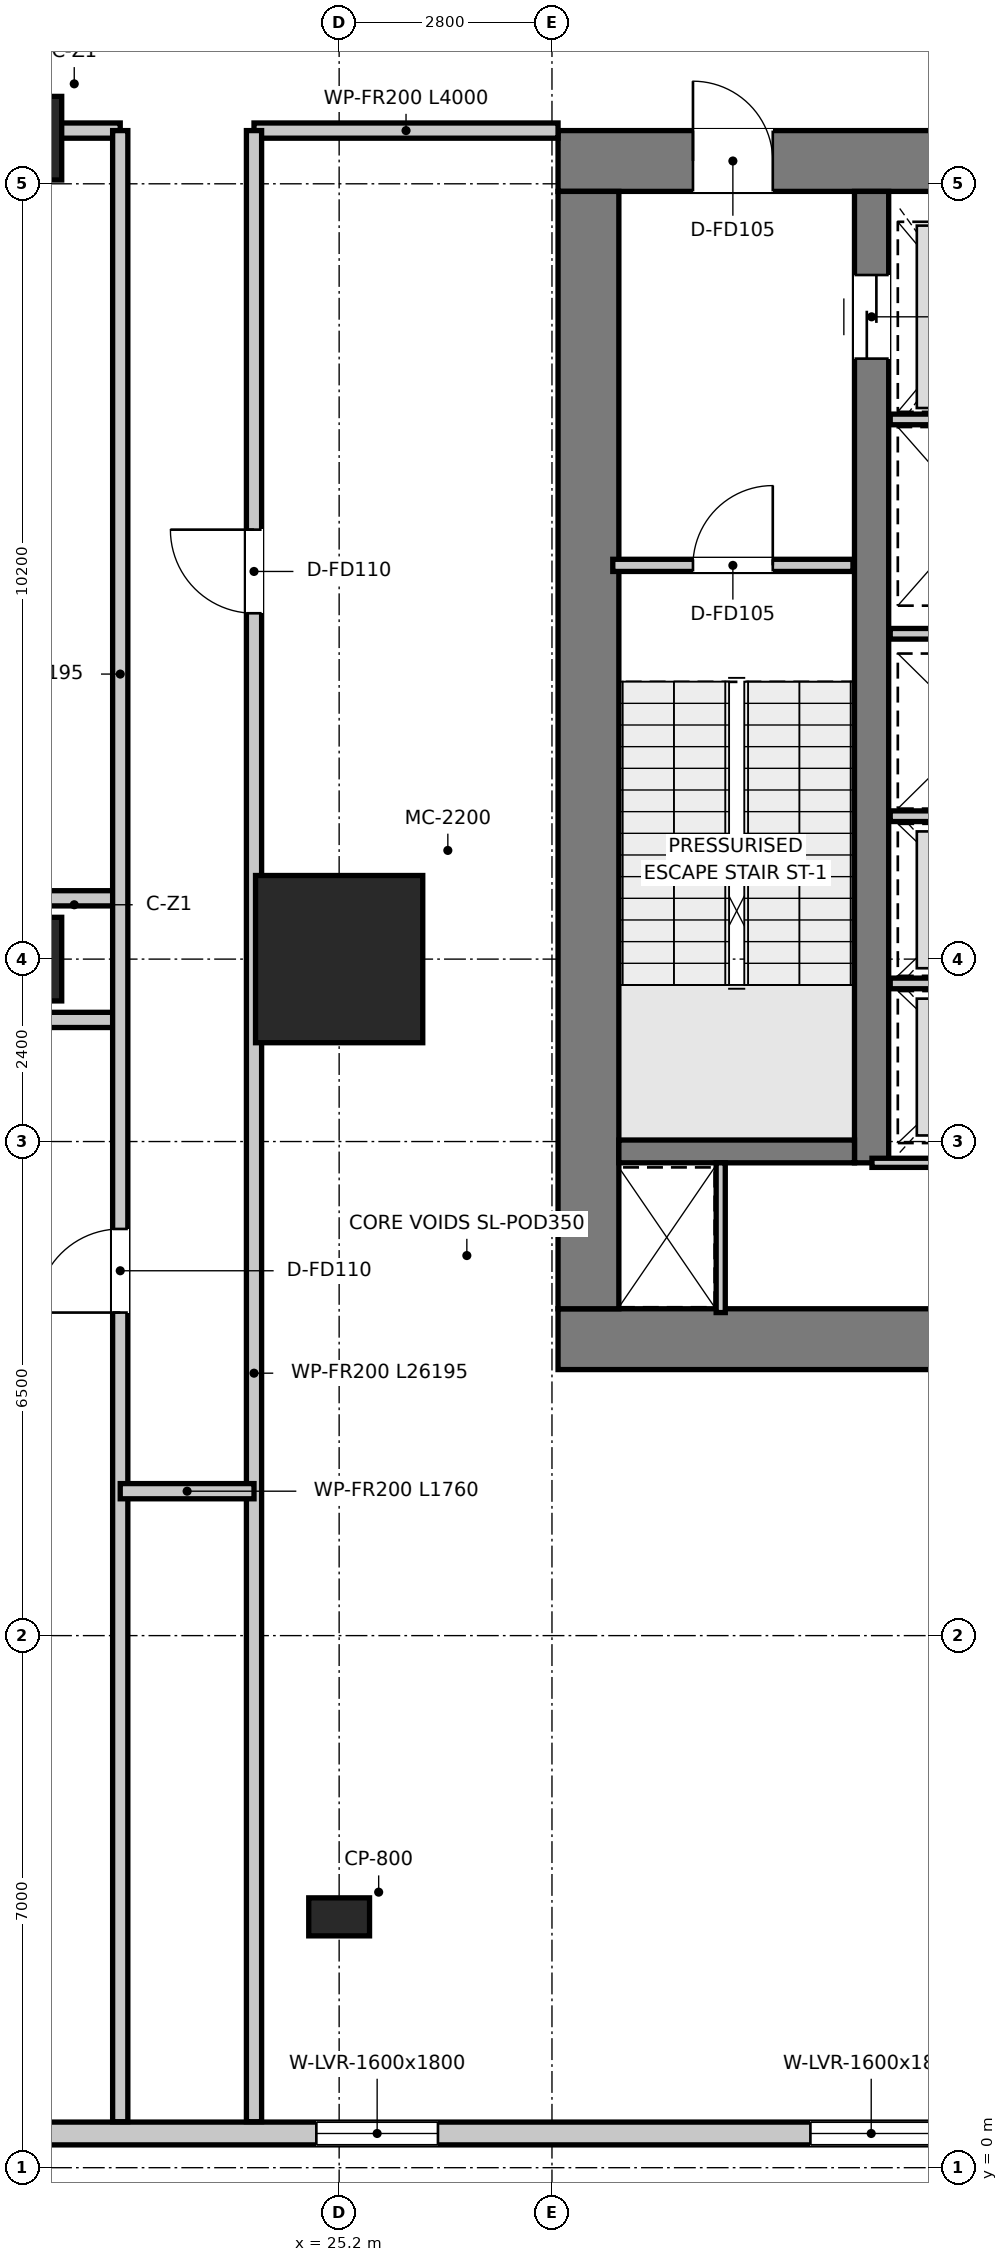
"""IFC4 building model, lengths in metres.
Left out: names, types, materials, properties, quantities, classifications, styles, units other than length and angle.
Written with IfcOpenShell. Run it as: python <this file> out.ifc"""

import sys

from ifc_helpers import new_model, si_unit, direction, frame, frame_2d, origin, origin_2d, place, context, subcontext, project, spatial, rectangle, extrude, source, transform, mapped, element, fill, save


model = new_model("IFC4")
c1 = context("Model", 3, precision=1e-05, world=origin(), true_north=direction((0.0, 1.0)))
c2 = subcontext(c1, "Body", "Model", "MODEL_VIEW")
j1 = project(units=[si_unit("LENGTHUNIT", "METRE"), si_unit("PLANEANGLEUNIT", "RADIAN")], contexts=[c1])
p1 = place(None, origin())
s1 = spatial("IfcSite", under=j1, at=p1, CompositionType="ELEMENT")
p2 = place(p1, origin())
s2 = spatial("IfcBuilding", under=s1, at=p2, CompositionType="ELEMENT")
p3 = place(p2, frame((0.0, 0.0, 20.0)))
s3 = spatial("IfcBuildingStorey", under=s2, at=p3, CompositionType="ELEMENT", Elevation=20.0)
p4 = place(p3, frame((28.08, 10.9, 0.0), z_axis=(0.0, 0.0, 1.0), x_axis=(1.0, 0.0, 0.0)))
e1 = element("IfcWall", 1, at=p4, inside=s3, PredefinedType="SHEAR", context=c2, shape_type="SweptSolid", body=[
    extrude(rectangle(XDim=15.84, YDim=0.8, at=frame_2d((7.92, 0.0))), origin(), (0.0, 0.0, 1.0), 5.0),
])
p5 = place(p3, frame((28.08, 26.4, 0.0), z_axis=(0.0, 0.0, 1.0), x_axis=(1.0, 0.0, 0.0)))
e2 = element("IfcWall", 2, at=p5, inside=s3, PredefinedType="SHEAR", context=c2, shape_type="SweptSolid", body=[
    extrude(rectangle(XDim=15.84, YDim=0.8, at=frame_2d((7.92, 0.0))), origin(), (0.0, 0.0, 1.0), 5.0),
])
p6 = place(p5, frame((7.22, 0.0, 0.0)))
e3 = element("IfcOpeningElement", 3, at=p6, cuts=e2, PredefinedType="OPENING", context=c2, shape_type="SweptSolid", body=[
    extrude(rectangle(XDim=1.4, YDim=2.2, at=frame_2d((0.7, 1.1))), frame((0.0, 0.41, 0.0), z_axis=(0.0, -1.0, 0.0), x_axis=(1.0, 0.0, 0.0)), (0.0, 0.0, 1.0), 0.82),
])
p7 = place(p5, frame((1.775, 0.0, 0.0)))
e4 = element("IfcOpeningElement", 4, at=p7, cuts=e2, PredefinedType="OPENING", context=c2, shape_type="SweptSolid", body=[
    extrude(rectangle(XDim=1.05, YDim=2.1, at=frame_2d((0.525, 1.05))), frame((0.0, 0.41, 0.0), z_axis=(0.0, -1.0, 0.0), x_axis=(1.0, 0.0, 0.0)), (0.0, 0.0, 1.0), 0.82),
])
p8 = place(p5, frame((13.015, 0.0, 0.0)))
e5 = element("IfcOpeningElement", 5, at=p8, cuts=e2, PredefinedType="OPENING", context=c2, shape_type="SweptSolid", body=[
    extrude(rectangle(XDim=1.05, YDim=2.1, at=frame_2d((0.525, 1.05))), frame((0.0, 0.41, 0.0), z_axis=(0.0, -1.0, 0.0), x_axis=(1.0, 0.0, 0.0)), (0.0, 0.0, 1.0), 0.82),
])
p9 = place(p3, frame((28.48, 11.3, 0.0), z_axis=(0.0, 0.0, 1.0), x_axis=(0.0, 1.0, 0.0)))
e6 = element("IfcWall", 6, at=p9, inside=s3, PredefinedType="SHEAR", context=c2, shape_type="SweptSolid", body=[
    extrude(rectangle(XDim=14.7, YDim=0.8, at=frame_2d((7.35, 0.0))), origin(), (0.0, 0.0, 1.0), 5.0),
])
p10 = place(p3, frame((32.205, 13.22, 0.0), z_axis=(0.0, 0.0, 1.0), x_axis=(0.0, 1.0, 0.0)))
e7 = element("IfcWall", 7, at=p10, inside=s3, PredefinedType="SHEAR", context=c2, shape_type="SweptSolid", body=[
    extrude(rectangle(XDim=12.78, YDim=0.45, at=frame_2d((6.39, 0.0))), origin(), (0.0, 0.0, 1.0), 5.0),
])
p11 = place(p10, frame((10.58, 0.0, 0.0)))
e8 = element("IfcOpeningElement", 8, at=p11, cuts=e7, PredefinedType="OPENING", context=c2, shape_type="SweptSolid", body=[
    extrude(rectangle(XDim=1.1, YDim=2.15, at=frame_2d((0.55, 1.075))), frame((0.0, 0.235, 0.0), z_axis=(0.0, -1.0, 0.0), x_axis=(1.0, 0.0, 0.0)), (0.0, 0.0, 1.0), 0.47),
])
p12 = place(p3, frame((28.88, 13.37, 0.0), z_axis=(0.0, 0.0, 1.0), x_axis=(1.0, 0.0, 0.0)))
e9 = element("IfcWall", 9, at=p12, inside=s3, PredefinedType="SHEAR", context=c2, shape_type="SweptSolid", body=[
    extrude(rectangle(XDim=3.1, YDim=0.3, at=frame_2d((1.55, 0.0))), origin(), (0.0, 0.0, 1.0), 5.0),
])
m1 = source(origin(), c2, "Body", "SweptSolid", [
    extrude(rectangle(XDim=2.2, YDim=2.2, at=origin_2d()), origin(), (0.0, 0.0, 1.0), 5.0),
])
p13 = place(p3, frame((25.2, 15.9, 0.0), z_axis=(0.0, 0.0, 1.0), x_axis=(1.0, 0.0, 0.0)))
e10 = element("IfcColumn", 10, at=p13, inside=s3, PredefinedType="USERDEFINED", context=c2, shape_type="MappedRepresentation", body=[
    mapped(m1, transform((0.0, 0.0, 0.0), x_axis=(1.0, 0.0, 0.0), y_axis=(0.0, 1.0, 0.0), z_axis=(0.0, 0.0, 1.0), scale=1.0)),
])
m2 = source(origin(), c2, "Body", "SweptSolid", [
    extrude(rectangle(XDim=1.1, YDim=1.1, at=origin_2d()), origin(), (0.0, 0.0, 1.0), 5.0),
])
for number, where, z_axis, x_axis in (
    (11, (21.0, 15.9, 0.0), (0.0, 0.0, 1.0), (1.0, 0.0, 0.0)),
    (12, (21.0, 26.7, 0.0), (0.0, 0.0, 1.0), (1.0, 0.0, 0.0)),
):
    element("IfcColumn", number, at=place(p3, frame(where, z_axis=z_axis, x_axis=x_axis)), inside=s3, PredefinedType="COLUMN", context=c2, shape_type="MappedRepresentation", body=[
        mapped(m2, transform((0.0, 0.0, 0.0), x_axis=(1.0, 0.0, 0.0), y_axis=(0.0, 1.0, 0.0), z_axis=(0.0, 0.0, 1.0), scale=1.0)),
    ])
m3 = source(origin(), c2, "Body", "SweptSolid", [
    extrude(rectangle(XDim=0.8, YDim=0.5, at=origin_2d()), origin(), (0.0, 0.0, 1.0), 5.0),
])
p14 = place(p3, frame((25.2, 3.3, 0.0), z_axis=(0.0, 0.0, 1.0), x_axis=(1.0, 0.0, 0.0)))
e13 = element("IfcColumn", 13, at=p14, inside=s3, PredefinedType="PILASTER", context=c2, shape_type="MappedRepresentation", body=[
    mapped(m3, transform((0.0, 0.0, 0.0), x_axis=(1.0, 0.0, 0.0), y_axis=(0.0, 1.0, 0.0), z_axis=(0.0, 0.0, 1.0), scale=1.0)),
])
p15 = place(p3, frame((61.0, 0.45, 0.0), z_axis=(0.0, 0.0, 1.0), x_axis=(-1.0, 0.0, 0.0)))
e14 = element("IfcWall", 14, at=p15, inside=s3, PredefinedType="SOLIDWALL", context=c2, shape_type="SweptSolid", body=[
    extrude(rectangle(XDim=50.0, YDim=0.3, at=frame_2d((25.0, 0.0))), origin(), (0.0, 0.0, 1.0), 4.72),
])
p16 = place(p15, frame((43.5, 0.0, 1.2)))
e15 = element("IfcOpeningElement", 15, at=p16, cuts=e14, PredefinedType="OPENING", context=c2, shape_type="SweptSolid", body=[
    extrude(rectangle(XDim=1.6, YDim=1.8, at=frame_2d((0.8, 0.9))), frame((0.0, 0.16, 0.0), z_axis=(0.0, -1.0, 0.0), x_axis=(1.0, 0.0, 0.0)), (0.0, 0.0, 1.0), 0.32),
])
p17 = place(p15, frame((34.5, 0.0, 1.2)))
e16 = element("IfcOpeningElement", 16, at=p17, cuts=e14, PredefinedType="OPENING", context=c2, shape_type="SweptSolid", body=[
    extrude(rectangle(XDim=1.6, YDim=1.8, at=frame_2d((0.8, 0.9))), frame((0.0, 0.16, 0.0), z_axis=(0.0, -1.0, 0.0), x_axis=(1.0, 0.0, 0.0)), (0.0, 0.0, 1.0), 0.32),
])
p18 = place(p15, frame((28.0, 0.0, 1.2)))
e17 = element("IfcOpeningElement", 17, at=p18, cuts=e14, PredefinedType="OPENING", context=c2, shape_type="SweptSolid", body=[
    extrude(rectangle(XDim=1.6, YDim=1.8, at=frame_2d((0.8, 0.9))), frame((0.0, 0.16, 0.0), z_axis=(0.0, -1.0, 0.0), x_axis=(1.0, 0.0, 0.0)), (0.0, 0.0, 1.0), 0.32),
])
p19 = place(p15, frame((20.0, 0.0, 1.2)))
e18 = element("IfcOpeningElement", 18, at=p19, cuts=e14, PredefinedType="OPENING", context=c2, shape_type="SweptSolid", body=[
    extrude(rectangle(XDim=1.6, YDim=1.8, at=frame_2d((0.8, 0.9))), frame((0.0, 0.16, 0.0), z_axis=(0.0, -1.0, 0.0), x_axis=(1.0, 0.0, 0.0)), (0.0, 0.0, 1.0), 0.32),
])
p20 = place(p15, frame((10.5, 0.0, 1.2)))
e19 = element("IfcOpeningElement", 19, at=p20, cuts=e14, PredefinedType="OPENING", context=c2, shape_type="SweptSolid", body=[
    extrude(rectangle(XDim=1.6, YDim=1.8, at=frame_2d((0.8, 0.9))), frame((0.0, 0.16, 0.0), z_axis=(0.0, -1.0, 0.0), x_axis=(1.0, 0.0, 0.0)), (0.0, 0.0, 1.0), 0.32),
])
p21 = place(p3, frame((28.8, 21.08, 0.0), z_axis=(0.0, 0.0, 1.0), x_axis=(1.0, 0.0, 0.0)))
e20 = element("IfcWall", 20, at=p21, inside=s3, PredefinedType="PARTITIONING", context=c2, shape_type="SweptSolid", body=[
    extrude(rectangle(XDim=3.16, YDim=0.16, at=frame_2d((1.58, 0.0))), origin(), (0.0, 0.0, 1.0), 4.72),
])
p22 = place(p21, frame((1.055, 0.0, 0.0)))
e21 = element("IfcOpeningElement", 21, at=p22, cuts=e20, PredefinedType="OPENING", context=c2, shape_type="SweptSolid", body=[
    extrude(rectangle(XDim=1.05, YDim=2.1, at=frame_2d((0.525, 1.05))), frame((0.0, 0.09, 0.0), z_axis=(0.0, -1.0, 0.0), x_axis=(1.0, 0.0, 0.0)), (0.0, 0.0, 1.0), 0.18),
])
p23 = place(p3, frame((32.45, 23.0, 0.0), z_axis=(0.0, 0.0, 1.0), x_axis=(1.0, 0.0, 0.0)))
e22 = element("IfcWall", 22, at=p23, inside=s3, PredefinedType="PARTITIONING", context=c2, shape_type="SweptSolid", body=[
    extrude(rectangle(XDim=2.27, YDim=0.14, at=frame_2d((1.135, 0.0))), origin(), (0.0, 0.0, 1.0), 3.52),
])
for number, where, z_axis, x_axis in (
    (23, (32.45, 17.78, 0.0), (0.0, 0.0, 1.0), (1.0, 0.0, 0.0)),
    (24, (32.45, 20.18, 0.0), (0.0, 0.0, 1.0), (1.0, 0.0, 0.0)),
    (25, (32.45, 15.58, 0.0), (0.0, 0.0, 1.0), (1.0, 0.0, 0.0)),
):
    element("IfcWall", number, at=place(p3, frame(where, z_axis=z_axis, x_axis=x_axis)), inside=s3, PredefinedType="PARTITIONING", context=c2, shape_type="SweptSolid", body=[
        extrude(rectangle(XDim=2.27, YDim=0.14, at=frame_2d((1.135, 0.0))), origin(), (0.0, 0.0, 1.0), 4.72),
    ])
p24 = place(p3, frame((30.22, 11.25, 0.0), z_axis=(0.0, 0.0, 1.0), x_axis=(0.0, 1.0, 0.0)))
e26 = element("IfcWall", 26, at=p24, inside=s3, PredefinedType="PARTITIONING", context=c2, shape_type="SweptSolid", body=[
    extrude(rectangle(XDim=1.97, YDim=0.12, at=frame_2d((0.985, 0.0))), origin(), (0.0, 0.0, 1.0), 4.72),
])
p25 = place(p3, frame((32.21, 13.22, 0.0), z_axis=(0.0, 0.0, 1.0), x_axis=(1.0, 0.0, 0.0)))
e27 = element("IfcWall", 27, at=p25, inside=s3, PredefinedType="PARTITIONING", context=c2, shape_type="SweptSolid", body=[
    extrude(rectangle(XDim=7.58, YDim=0.12, at=frame_2d((3.79, 0.0))), origin(), (0.0, 0.0, 1.0), 4.72),
])
p26 = place(p25, frame((3.365, 0.0, 0.0)))
e28 = element("IfcOpeningElement", 28, at=p26, cuts=e27, PredefinedType="OPENING", context=c2, shape_type="SweptSolid", body=[
    extrude(rectangle(XDim=0.85, YDim=2.1, at=frame_2d((0.425, 1.05))), frame((0.0, 0.07, 0.0), z_axis=(0.0, -1.0, 0.0), x_axis=(1.0, 0.0, 0.0)), (0.0, 0.0, 1.0), 0.14),
])
p27 = place(p3, frame((11.305, 26.8, 0.0), z_axis=(0.0, 0.0, 1.0), x_axis=(1.0, 0.0, 0.0)))
e29 = element("IfcWall", 29, at=p27, inside=s3, PredefinedType="PARTITIONING", context=c2, shape_type="SweptSolid", body=[
    extrude(rectangle(XDim=11.015, YDim=0.2, at=frame_2d((5.508, 0.0))), origin(), (0.0, 0.0, 1.0), 2.92),
])
p28 = place(p27, frame((7.745, 0.0, 0.0)))
e30 = element("IfcOpeningElement", 30, at=p28, cuts=e29, PredefinedType="OPENING", context=c2, shape_type="SweptSolid", body=[
    extrude(rectangle(XDim=1.1, YDim=2.15, at=frame_2d((0.55, 1.075))), frame((0.0, 0.11, 0.0), z_axis=(0.0, -1.0, 0.0), x_axis=(1.0, 0.0, 0.0)), (0.0, 0.0, 1.0), 0.22),
])
p29 = place(p3, frame((24.08, 26.8, 0.0), z_axis=(0.0, 0.0, 1.0), x_axis=(1.0, 0.0, 0.0)))
e31 = element("IfcWall", 31, at=p29, inside=s3, PredefinedType="PARTITIONING", context=c2, shape_type="SweptSolid", body=[
    extrude(rectangle(XDim=4.0, YDim=0.2, at=frame_2d((2.0, 0.0))), origin(), (0.0, 0.0, 1.0), 3.92),
])
p30 = place(p3, frame((11.305, 15.1, 0.0), z_axis=(0.0, 0.0, 1.0), x_axis=(1.0, 0.0, 0.0)))
e32 = element("IfcWall", 32, at=p30, inside=s3, PredefinedType="PARTITIONING", context=c2, shape_type="SweptSolid", body=[
    extrude(rectangle(XDim=11.015, YDim=0.2, at=frame_2d((5.508, 0.0))), origin(), (0.0, 0.0, 1.0), 4.03),
])
p31 = place(p3, frame((11.305, 16.7, 0.0), z_axis=(0.0, 0.0, 1.0), x_axis=(1.0, 0.0, 0.0)))
e33 = element("IfcWall", 33, at=p31, inside=s3, PredefinedType="PARTITIONING", context=c2, shape_type="SweptSolid", body=[
    extrude(rectangle(XDim=11.015, YDim=0.2, at=frame_2d((5.508, 0.0))), origin(), (0.0, 0.0, 1.0), 2.92),
])
p32 = place(p3, frame((22.32, 0.605, 0.0), z_axis=(0.0, 0.0, 1.0), x_axis=(0.0, 1.0, 0.0)))
e34 = element("IfcWall", 34, at=p32, inside=s3, PredefinedType="PARTITIONING", context=c2, shape_type="SweptSolid", body=[
    extrude(rectangle(XDim=26.195, YDim=0.2, at=frame_2d((13.098, 0.0))), origin(), (0.0, 0.0, 1.0), 4.02),
])
p33 = place(p32, frame((10.645, 0.0, 0.0)))
e35 = element("IfcOpeningElement", 35, at=p33, cuts=e34, PredefinedType="OPENING", context=c2, shape_type="SweptSolid", body=[
    extrude(rectangle(XDim=1.1, YDim=2.15, at=frame_2d((0.55, 1.075))), frame((0.0, 0.11, 0.0), z_axis=(0.0, -1.0, 0.0), x_axis=(1.0, 0.0, 0.0)), (0.0, 0.0, 1.0), 0.22),
])
p34 = place(p3, frame((24.08, 0.605, 0.0), z_axis=(0.0, 0.0, 1.0), x_axis=(0.0, 1.0, 0.0)))
e36 = element("IfcWall", 36, at=p34, inside=s3, PredefinedType="PARTITIONING", context=c2, shape_type="SweptSolid", body=[
    extrude(rectangle(XDim=26.195, YDim=0.2, at=frame_2d((13.098, 0.0))), origin(), (0.0, 0.0, 1.0), 4.02),
])
p35 = place(p34, frame((19.845, 0.0, 0.0)))
e37 = element("IfcOpeningElement", 37, at=p35, cuts=e36, PredefinedType="OPENING", context=c2, shape_type="SweptSolid", body=[
    extrude(rectangle(XDim=1.1, YDim=2.15, at=frame_2d((0.55, 1.075))), frame((0.0, 0.11, 0.0), z_axis=(0.0, -1.0, 0.0), x_axis=(1.0, 0.0, 0.0)), (0.0, 0.0, 1.0), 0.22),
])
p36 = place(p3, frame((22.32, 8.9, 0.0), z_axis=(0.0, 0.0, 1.0), x_axis=(1.0, 0.0, 0.0)))
e38 = element("IfcWall", 38, at=p36, inside=s3, PredefinedType="PARTITIONING", context=c2, shape_type="SweptSolid", body=[
    extrude(rectangle(XDim=1.76, YDim=0.2, at=frame_2d((0.88, 0.0))), origin(), (0.0, 0.0, 1.0), 4.72),
])
p37 = place(p17, origin())
e39 = element("IfcWindow", 39, at=p37, inside=s3, PartitioningType="SINGLE_PANEL", PredefinedType="WINDOW", context=c2, shape_type="SweptSolid", body=[
    extrude(rectangle(XDim=1.6, YDim=1.8, at=frame_2d((0.8, 0.9))), frame((0.0, 0.03, 0.0), z_axis=(0.0, -1.0, 0.0), x_axis=(1.0, 0.0, 0.0)), (0.0, 0.0, 1.0), 0.06),
])
fill(e16, e39)
p38 = place(p18, origin())
e40 = element("IfcWindow", 40, at=p38, inside=s3, PartitioningType="SINGLE_PANEL", PredefinedType="WINDOW", context=c2, shape_type="SweptSolid", body=[
    extrude(rectangle(XDim=1.6, YDim=1.8, at=frame_2d((0.8, 0.9))), frame((0.0, 0.03, 0.0), z_axis=(0.0, -1.0, 0.0), x_axis=(1.0, 0.0, 0.0)), (0.0, 0.0, 1.0), 0.06),
])
fill(e17, e40)
p39 = place(p22, origin())
e41 = element("IfcDoor", 41, at=p39, inside=s3, OperationType="SINGLE_SWING_RIGHT", PredefinedType="DOOR", context=c2, shape_type="SweptSolid", body=[
    extrude(rectangle(XDim=1.05, YDim=2.1, at=frame_2d((0.525, 1.05))), frame((0.0, 0.025, 0.0), z_axis=(0.0, -1.0, 0.0), x_axis=(1.0, 0.0, 0.0)), (0.0, 0.0, 1.0), 0.05),
])
fill(e21, e41)
p40 = place(p7, origin())
e42 = element("IfcDoor", 42, at=p40, inside=s3, OperationType="SINGLE_SWING_LEFT", PredefinedType="DOOR", context=c2, shape_type="SweptSolid", body=[
    extrude(rectangle(XDim=1.05, YDim=2.1, at=frame_2d((0.525, 1.05))), frame((0.0, 0.025, 0.0), z_axis=(0.0, -1.0, 0.0), x_axis=(1.0, 0.0, 0.0)), (0.0, 0.0, 1.0), 0.05),
])
fill(e4, e42)
p41 = place(p11, origin())
e43 = element("IfcDoor", 43, at=p41, inside=s3, OperationType="DOUBLE_DOOR_SLIDING", PredefinedType="DOOR", context=c2, shape_type="SweptSolid", body=[
    extrude(rectangle(XDim=1.1, YDim=2.15, at=frame_2d((0.55, 1.075))), frame((0.0, 0.025, 0.0), z_axis=(0.0, -1.0, 0.0), x_axis=(1.0, 0.0, 0.0)), (0.0, 0.0, 1.0), 0.05),
])
fill(e8, e43)
p42 = place(p33, origin())
e44 = element("IfcDoor", 44, at=p42, inside=s3, OperationType="SINGLE_SWING_LEFT", PredefinedType="DOOR", context=c2, shape_type="SweptSolid", body=[
    extrude(rectangle(XDim=1.1, YDim=2.15, at=frame_2d((0.55, 1.075))), frame((0.0, 0.025, 0.0), z_axis=(0.0, -1.0, 0.0), x_axis=(1.0, 0.0, 0.0)), (0.0, 0.0, 1.0), 0.05),
])
fill(e35, e44)
p43 = place(p35, origin())
e45 = element("IfcDoor", 45, at=p43, inside=s3, OperationType="SINGLE_SWING_RIGHT", PredefinedType="DOOR", context=c2, shape_type="SweptSolid", body=[
    extrude(rectangle(XDim=1.1, YDim=2.15, at=frame_2d((0.55, 1.075))), frame((0.0, 0.025, 0.0), z_axis=(0.0, -1.0, 0.0), x_axis=(1.0, 0.0, 0.0)), (0.0, 0.0, 1.0), 0.05),
])
fill(e37, e45)
save(model, sys.argv[1])
